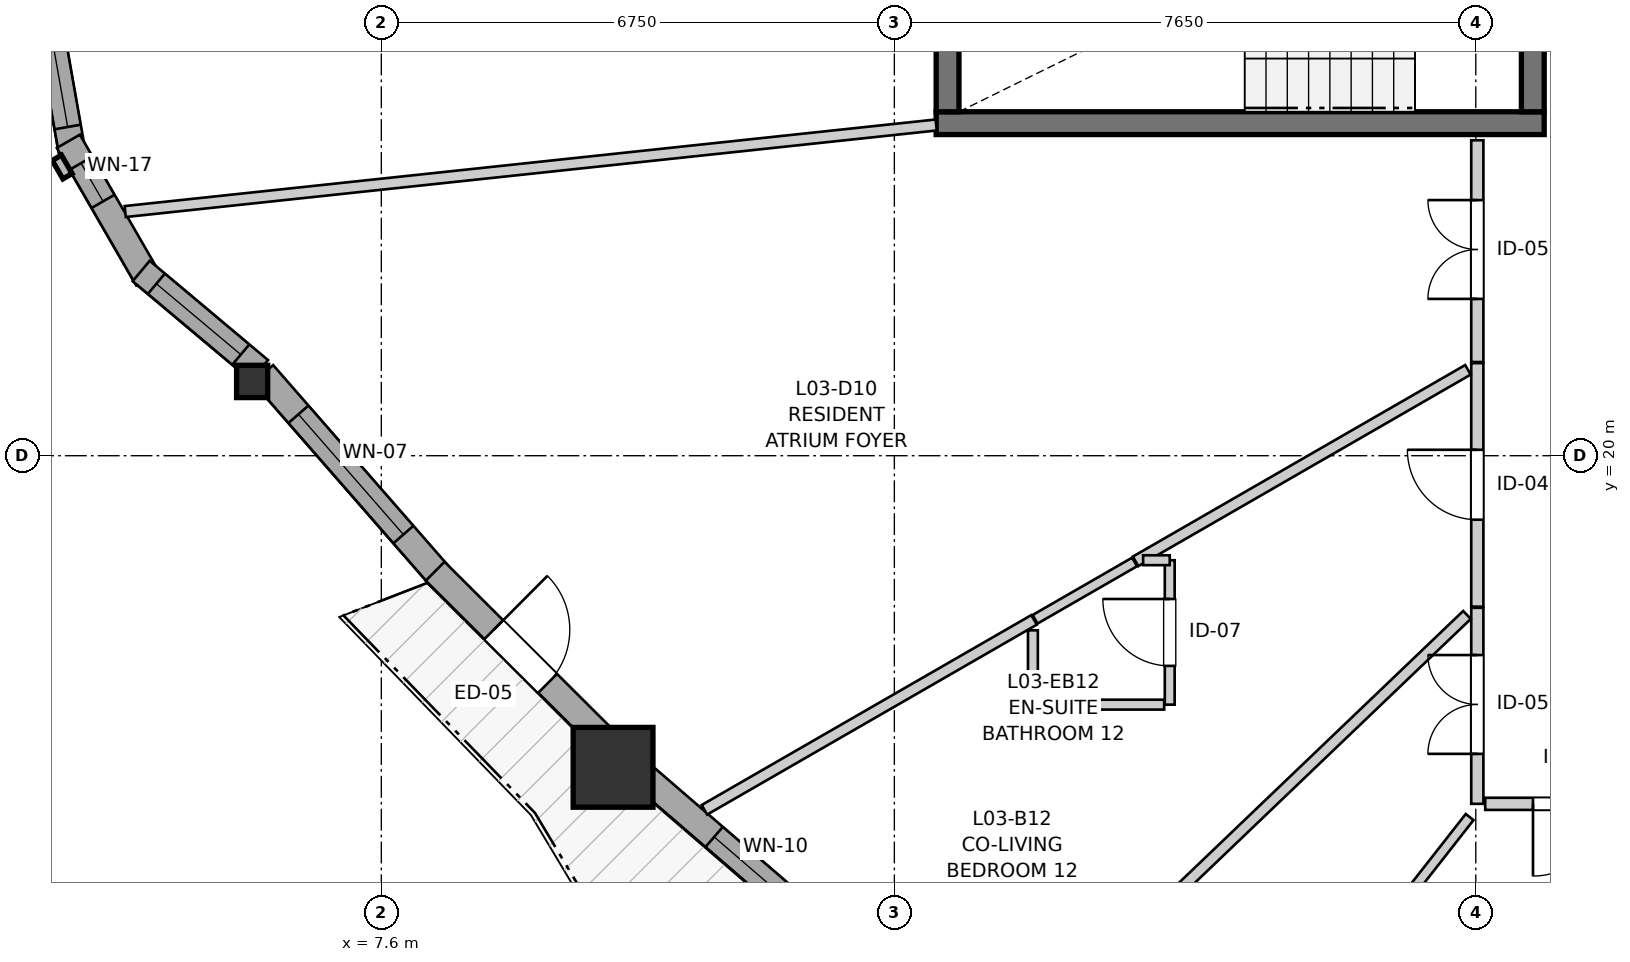
"""IFC4 building model, lengths in metres.
Left out: names, types, materials, properties, quantities, classifications, styles, units other than length and angle.
Written with IfcOpenShell. Run it as: python <this file> out.ifc"""

import sys

from ifc_helpers import new_model, si_unit, direction, frame, frame_2d, origin, origin_2d, place, context, subcontext, project, spatial, rectangle, i_section, extrude, source, transform, mapped, element, fill, save


model = new_model("IFC4")
c1 = context("Model", 3, precision=1e-05, world=origin(), true_north=direction((0.0, 1.0)))
c2 = subcontext(c1, "Body", "Model", "MODEL_VIEW")
j1 = project(units=[si_unit("LENGTHUNIT", "METRE"), si_unit("PLANEANGLEUNIT", "RADIAN")], contexts=[c1])
p1 = place(None, origin())
s1 = spatial("IfcSite", under=j1, at=p1, CompositionType="ELEMENT")
p2 = place(p1, origin())
s2 = spatial("IfcBuilding", under=s1, at=p2, CompositionType="ELEMENT")
p3 = place(p2, frame((0.0, 0.0, 14.2)))
s3 = spatial("IfcBuildingStorey", under=s2, at=p3, CompositionType="ELEMENT", Elevation=14.2)
p4 = place(p3, frame((14.9, 24.375, 0.0), z_axis=(0.0, 0.0, 1.0), x_axis=(1.0, 0.0, 0.0)))
e1 = element("IfcWall", 1, at=p4, inside=s3, PredefinedType="SHEAR", context=c2, shape_type="SweptSolid", body=[
    extrude(rectangle(XDim=8.0, YDim=0.3, at=frame_2d((4.0, 0.0))), origin(), (0.0, 0.0, 1.0), 2.94),
])
p5 = place(p3, frame((15.05, 27.475, 0.0), z_axis=(0.0, 0.0, 1.0), x_axis=(0.0, -1.0, 0.0)))
e2 = element("IfcWall", 2, at=p5, inside=s3, PredefinedType="SHEAR", context=c2, shape_type="SweptSolid", body=[
    extrude(rectangle(XDim=2.95, YDim=0.3, at=frame_2d((1.475, 0.0))), origin(), (0.0, 0.0, 1.0), 2.94),
])
p6 = place(p3, frame((22.75, 24.525, 0.0), z_axis=(0.0, 0.0, 1.0), x_axis=(0.0, 1.0, 0.0)))
e3 = element("IfcWall", 3, at=p6, inside=s3, PredefinedType="SHEAR", context=c2, shape_type="SweptSolid", body=[
    extrude(rectangle(XDim=2.95, YDim=0.3, at=frame_2d((1.475, 0.0))), origin(), (0.0, 0.0, 1.0), 2.94),
])
p7 = place(p6, frame((0.985, 0.0, 0.0)))
e4 = element("IfcOpeningElement", 4, at=p7, cuts=e3, PredefinedType="OPENING", context=c2, shape_type="SweptSolid", body=[
    extrude(rectangle(XDim=0.98, YDim=2.15, at=frame_2d((0.49, 1.075))), frame((0.0, 0.16, 0.0), z_axis=(0.0, -1.0, 0.0), x_axis=(1.0, 0.0, 0.0)), (0.0, 0.0, 1.0), 0.32),
])
m1 = source(origin(), c2, "Body", "SweptSolid", [
    extrude(i_section(OverallWidth=0.409, OverallDepth=0.425, WebThickness=0.03, FlangeThickness=0.048, FilletRadius=0.015, at=origin_2d()), origin(), (0.0, 0.0, 1.0), 2.94),
])
p8 = place(p3, frame((5.9, 20.977, 0.0), z_axis=(0.0, 0.0, 1.0), x_axis=(1.0, 0.0, 0.0)))
e5 = element("IfcColumn", 5, at=p8, inside=s3, PredefinedType="PILASTER", context=c2, shape_type="MappedRepresentation", body=[
    mapped(m1, transform((0.0, 0.0, 0.0), x_axis=(1.0, 0.0, 0.0), y_axis=(0.0, 1.0, 0.0), z_axis=(0.0, 0.0, 1.0), scale=1.0)),
])
m2 = source(origin(), c2, "Body", "SweptSolid", [
    extrude(rectangle(XDim=1.05, YDim=1.05, at=origin_2d()), origin(), (0.0, 0.0, 1.0), 2.94),
])
p9 = place(p3, frame((10.649, 15.9, 0.0), z_axis=(0.0, 0.0, 1.0), x_axis=(1.0, 0.0, 0.0)))
e6 = element("IfcColumn", 6, at=p9, inside=s3, PredefinedType="COLUMN", context=c2, shape_type="MappedRepresentation", body=[
    mapped(m2, transform((0.0, 0.0, 0.0), x_axis=(1.0, 0.0, 0.0), y_axis=(0.0, 1.0, 0.0), z_axis=(0.0, 0.0, 1.0), scale=1.0)),
])
p10 = place(p3, frame((3.166, 26.068, 0.0), z_axis=(0.0, 0.0, 1.0), x_axis=(0.173672066494, -0.984803540469, 0.0)))
e7 = element("IfcWall", 7, at=p10, inside=s3, PredefinedType="SOLIDWALL", context=c2, shape_type="SweptSolid", body=[
    extrude(rectangle(XDim=2.09, YDim=0.35, at=frame_2d((1.045, 0.0))), origin(), (0.0, 0.0, 1.0), 2.42),
])
p11 = place(p10, frame((0.32, 0.0, 0.82)))
e8 = element("IfcOpeningElement", 8, at=p11, cuts=e7, PredefinedType="OPENING", context=c2, shape_type="SweptSolid", body=[
    extrude(rectangle(XDim=1.45, YDim=1.25, at=frame_2d((0.725, 0.625))), frame((0.0, 0.185, 0.0), z_axis=(0.0, -1.0, 0.0), x_axis=(1.0, 0.0, 0.0)), (0.0, 0.0, 1.0), 0.37),
])
p12 = place(p3, frame((3.482, 24.137, 0.0), z_axis=(0.0, 0.0, 1.0), x_axis=(0.499995423472, -0.866028046028, 0.0)))
e9 = element("IfcWall", 9, at=p12, inside=s3, PredefinedType="SOLIDWALL", context=c2, shape_type="SweptSolid", body=[
    extrude(rectangle(XDim=2.09, YDim=0.35, at=frame_2d((1.045, 0.0))), origin(), (0.0, 0.0, 1.0), 2.42),
])
p13 = place(p12, frame((0.333, 0.0, 0.82)))
e10 = element("IfcOpeningElement", 10, at=p13, cuts=e9, PredefinedType="OPENING", context=c2, shape_type="SweptSolid", body=[
    extrude(rectangle(XDim=0.58, YDim=1.35, at=frame_2d((0.29, 0.675))), frame((0.0, 0.185, 0.0), z_axis=(0.0, -1.0, 0.0), x_axis=(1.0, 0.0, 0.0)), (0.0, 0.0, 1.0), 0.37),
])
p14 = place(p3, frame((4.44, 22.43, 0.0), z_axis=(0.0, 0.0, 1.0), x_axis=(0.766090423188, -0.642732808793, 0.0)))
e11 = element("IfcWall", 11, at=p14, inside=s3, PredefinedType="SOLIDWALL", context=c2, shape_type="SweptSolid", body=[
    extrude(rectangle(XDim=2.032, YDim=0.35, at=frame_2d((1.016, 0.0))), origin(), (0.0, 0.0, 1.0), 2.42),
])
p15 = place(p14, frame((0.261, 0.0, 0.82)))
e12 = element("IfcOpeningElement", 12, at=p15, cuts=e11, PredefinedType="OPENING", context=c2, shape_type="SweptSolid", body=[
    extrude(rectangle(XDim=1.45, YDim=1.25, at=frame_2d((0.725, 0.625))), frame((0.0, 0.185, 0.0), z_axis=(0.0, -1.0, 0.0), x_axis=(1.0, 0.0, 0.0)), (0.0, 0.0, 1.0), 0.37),
])
p16 = place(p3, frame((6.045, 21.077, 0.0), z_axis=(0.0, 0.0, 1.0), x_axis=(0.657628390725, -0.753342485004, 0.0)))
e13 = element("IfcWall", 13, at=p16, inside=s3, PredefinedType="SOLIDWALL", context=c2, shape_type="SweptSolid", body=[
    extrude(rectangle(XDim=3.533, YDim=0.35, at=frame_2d((1.766, 0.0))), origin(), (0.0, 0.0, 1.0), 2.42),
])
p17 = place(p16, frame((0.706, 0.0, 0.82)))
e14 = element("IfcOpeningElement", 14, at=p17, cuts=e13, PredefinedType="OPENING", context=c2, shape_type="SweptSolid", body=[
    extrude(rectangle(XDim=2.1, YDim=1.4, at=frame_2d((1.05, 0.7))), frame((0.0, 0.185, 0.0), z_axis=(0.0, -1.0, 0.0), x_axis=(1.0, 0.0, 0.0)), (0.0, 0.0, 1.0), 0.37),
])
p18 = place(p3, frame((8.308, 18.48, 0.0), z_axis=(0.0, 0.0, 1.0), x_axis=(0.708411049028, -0.705800103156, 0.0)))
e15 = element("IfcWall", 15, at=p18, inside=s3, PredefinedType="SOLIDWALL", context=c2, shape_type="SweptSolid", body=[
    extrude(rectangle(XDim=3.179, YDim=0.35, at=frame_2d((1.59, 0.0))), origin(), (0.0, 0.0, 1.0), 2.42),
])
p19 = place(p18, frame((1.09, 0.0, 0.0)))
e16 = element("IfcOpeningElement", 16, at=p19, cuts=e15, PredefinedType="OPENING", context=c2, shape_type="SweptSolid", body=[
    extrude(rectangle(XDim=1.0, YDim=2.1, at=frame_2d((0.5, 1.05))), frame((0.0, 0.185, 0.0), z_axis=(0.0, -1.0, 0.0), x_axis=(1.0, 0.0, 0.0)), (0.0, 0.0, 1.0), 0.37),
])
p20 = place(p3, frame((10.99, 15.837, 0.0), z_axis=(0.0, 0.0, 1.0), x_axis=(0.757465946779, -0.652874673632, 0.0)))
e17 = element("IfcWall", 17, at=p20, inside=s3, PredefinedType="SOLIDWALL", context=c2, shape_type="SweptSolid", body=[
    extrude(rectangle(XDim=3.123, YDim=0.35, at=frame_2d((1.562, 0.0))), origin(), (0.0, 0.0, 1.0), 2.42),
])
p21 = place(p20, frame((1.305, 0.0, 0.82)))
e18 = element("IfcOpeningElement", 18, at=p21, cuts=e17, PredefinedType="OPENING", context=c2, shape_type="SweptSolid", body=[
    extrude(rectangle(XDim=1.4, YDim=1.35, at=frame_2d((0.7, 0.675))), frame((0.0, 0.185, 0.0), z_axis=(0.0, -1.0, 0.0), x_axis=(1.0, 0.0, 0.0)), (0.0, 0.0, 1.0), 0.37),
])
p22 = place(p3, frame((22.02, 18.014, 0.0), z_axis=(0.0, 0.0, 1.0), x_axis=(0.0, 1.0, 0.0)))
e19 = element("IfcWall", 19, at=p22, inside=s3, PredefinedType="PARTITIONING", context=c2, shape_type="SweptSolid", body=[
    extrude(rectangle(XDim=3.204, YDim=0.16, at=frame_2d((1.602, 0.0))), origin(), (0.0, 0.0, 1.0), 2.94),
])
p23 = place(p22, frame((1.144, 0.0, 0.0)))
e20 = element("IfcOpeningElement", 20, at=p23, cuts=e19, PredefinedType="OPENING", context=c2, shape_type="SweptSolid", body=[
    extrude(rectangle(XDim=0.92, YDim=2.1, at=frame_2d((0.46, 1.05))), frame((0.0, 0.09, 0.0), z_axis=(0.0, -1.0, 0.0), x_axis=(1.0, 0.0, 0.0)), (0.0, 0.0, 1.0), 0.18),
])
p24 = place(p3, frame((22.02, 21.233, 0.0), z_axis=(0.0, 0.0, 1.0), x_axis=(0.0, 1.0, 0.0)))
e21 = element("IfcWall", 21, at=p24, inside=s3, PredefinedType="PARTITIONING", context=c2, shape_type="SweptSolid", body=[
    extrude(rectangle(XDim=2.917, YDim=0.16, at=frame_2d((1.458, 0.0))), origin(), (0.0, 0.0, 1.0), 2.94),
])
p25 = place(p24, frame((0.83, 0.0, 0.0)))
e22 = element("IfcOpeningElement", 22, at=p25, cuts=e21, PredefinedType="OPENING", context=c2, shape_type="SweptSolid", body=[
    extrude(rectangle(XDim=1.3, YDim=2.1, at=frame_2d((0.65, 1.05))), frame((0.0, 0.09, 0.0), z_axis=(0.0, -1.0, 0.0), x_axis=(1.0, 0.0, 0.0)), (0.0, 0.0, 1.0), 0.18),
])
p26 = place(p3, frame((22.02, 15.42, 0.0), z_axis=(0.0, 0.0, 1.0), x_axis=(0.0, 1.0, 0.0)))
e23 = element("IfcWall", 23, at=p26, inside=s3, PredefinedType="PARTITIONING", context=c2, shape_type="SweptSolid", body=[
    extrude(rectangle(XDim=2.579, YDim=0.16, at=frame_2d((1.29, 0.0))), origin(), (0.0, 0.0, 1.0), 2.94),
])
p27 = place(p26, frame((0.657, 0.0, 0.0)))
e24 = element("IfcOpeningElement", 24, at=p27, cuts=e23, PredefinedType="OPENING", context=c2, shape_type="SweptSolid", body=[
    extrude(rectangle(XDim=1.3, YDim=2.1, at=frame_2d((0.65, 1.05))), frame((0.0, 0.09, 0.0), z_axis=(0.0, -1.0, 0.0), x_axis=(1.0, 0.0, 0.0)), (0.0, 0.0, 1.0), 0.18),
])
p28 = place(p3, frame((24.368, 15.42, 0.0), z_axis=(0.0, 0.0, 1.0), x_axis=(-1.0, 0.0, 0.0)))
e25 = element("IfcWall", 25, at=p28, inside=s3, PredefinedType="PARTITIONING", context=c2, shape_type="SweptSolid", body=[
    extrude(rectangle(XDim=2.244, YDim=0.16, at=frame_2d((1.122, 0.0))), origin(), (0.0, 0.0, 1.0), 2.94),
])
p29 = place(p28, frame((0.666, 0.0, 0.0)))
e26 = element("IfcOpeningElement", 26, at=p29, cuts=e25, PredefinedType="OPENING", context=c2, shape_type="SweptSolid", body=[
    extrude(rectangle(XDim=0.95, YDim=2.1, at=frame_2d((0.475, 1.05))), frame((0.0, 0.09, 0.0), z_axis=(0.0, -1.0, 0.0), x_axis=(1.0, 0.0, 0.0)), (0.0, 0.0, 1.0), 0.18),
])
p30 = place(p3, frame((17.973, 16.725, 0.0), z_axis=(0.0, 0.0, 1.0), x_axis=(0.0, 1.0, 0.0)))
e27 = element("IfcWall", 27, at=p30, inside=s3, PredefinedType="PARTITIONING", context=c2, shape_type="SweptSolid", body=[
    extrude(rectangle(XDim=1.9, YDim=0.13, at=frame_2d((0.95, 0.0))), origin(), (0.0, 0.0, 1.0), 2.94),
])
p31 = place(p30, frame((0.51, 0.0, 0.0)))
e28 = element("IfcOpeningElement", 28, at=p31, cuts=e27, PredefinedType="OPENING", context=c2, shape_type="SweptSolid", body=[
    extrude(rectangle(XDim=0.88, YDim=2.05, at=frame_2d((0.44, 1.025))), frame((0.0, 0.075, 0.0), z_axis=(0.0, -1.0, 0.0), x_axis=(1.0, 0.0, 0.0)), (0.0, 0.0, 1.0), 0.15),
])
p32 = place(p3, frame((4.231, 23.212, 0.0), z_axis=(0.0, 0.0, 1.0), x_axis=(0.994353055544, 0.106122575023, 0.0)))
e29 = element("IfcWall", 29, at=p32, inside=s3, PredefinedType="PARTITIONING", context=c2, shape_type="SweptSolid", body=[
    extrude(rectangle(XDim=10.73, YDim=0.145, at=frame_2d((5.365, 0.0))), origin(), (0.0, 0.0, 1.0), 2.94),
])
p33 = place(p3, frame((15.888, 12.171, 0.0), z_axis=(0.0, 0.0, 1.0), x_axis=(0.722733244608, 0.691127091886, 0.0)))
e30 = element("IfcWall", 30, at=p33, inside=s3, PredefinedType="PARTITIONING", context=c2, shape_type="SweptSolid", body=[
    extrude(rectangle(XDim=8.296, YDim=0.145, at=frame_2d((4.148, 0.0))), origin(), (0.0, 0.0, 1.0), 2.94),
])
p34 = place(p3, frame((18.296, 10.625, 0.0), z_axis=(0.0, 0.0, 1.0), x_axis=(0.616906721473, 0.787036274261, 0.0)))
e31 = element("IfcWall", 31, at=p34, inside=s3, PredefinedType="PARTITIONING", context=c2, shape_type="SweptSolid", body=[
    extrude(rectangle(XDim=5.872, YDim=0.13, at=frame_2d((2.936, 0.0))), origin(), (0.0, 0.0, 1.0), 2.94),
])
p35 = place(p3, frame((17.524, 18.61, 0.0), z_axis=(0.0, 0.0, 1.0), x_axis=(0.866454437228, 0.499256154903, 0.0)))
e32 = element("IfcWall", 32, at=p35, inside=s3, PredefinedType="PARTITIONING", context=c2, shape_type="SweptSolid", body=[
    extrude(rectangle(XDim=5.047, YDim=0.145, at=frame_2d((2.523, 0.0))), origin(), (0.0, 0.0, 1.0), 2.94),
])
p36 = place(p3, frame((11.851, 15.342, 0.0), z_axis=(0.0, 0.0, 1.0), x_axis=(0.86649075999, 0.499193111784, 0.0)))
e33 = element("IfcWall", 33, at=p36, inside=s3, PredefinedType="PARTITIONING", context=c2, shape_type="SweptSolid", body=[
    extrude(rectangle(XDim=5.005, YDim=0.145, at=frame_2d((2.502, 0.0))), origin(), (0.0, 0.0, 1.0), 2.94),
])
p37 = place(p3, frame((16.173, 16.725, 0.0), z_axis=(0.0, 0.0, 1.0), x_axis=(1.0, 0.0, 0.0)))
e34 = element("IfcWall", 34, at=p37, inside=s3, PredefinedType="PARTITIONING", context=c2, shape_type="SweptSolid", body=[
    extrude(rectangle(XDim=1.727, YDim=0.13, at=frame_2d((0.863, 0.0))), origin(), (0.0, 0.0, 1.0), 2.94),
])
p38 = place(p3, frame((16.201, 17.848, 0.0), z_axis=(0.0, 0.0, 1.0), x_axis=(0.866448907576, 0.49926575144, 0.0)))
e35 = element("IfcWall", 35, at=p38, inside=s3, PredefinedType="PARTITIONING", context=c2, shape_type="SweptSolid", body=[
    extrude(rectangle(XDim=1.512, YDim=0.13, at=frame_2d((0.756, 0.0))), origin(), (0.0, 0.0, 1.0), 2.94),
])
p39 = place(p3, frame((16.173, 16.798, 0.0), z_axis=(0.0, 0.0, 1.0), x_axis=(0.0, 1.0, 0.0)))
e36 = element("IfcWall", 36, at=p39, inside=s3, PredefinedType="PARTITIONING", context=c2, shape_type="SweptSolid", body=[
    extrude(rectangle(XDim=0.905, YDim=0.13, at=frame_2d((0.452, 0.0))), origin(), (0.0, 0.0, 1.0), 2.94),
])
p40 = place(p3, frame((17.623, 18.625, 0.0), z_axis=(0.0, 0.0, 1.0), x_axis=(1.0, 0.0, 0.0)))
e37 = element("IfcWall", 37, at=p40, inside=s3, PredefinedType="PARTITIONING", context=c2, shape_type="SweptSolid", body=[
    extrude(rectangle(XDim=0.35, YDim=0.13, at=frame_2d((0.175, 0.0))), origin(), (0.0, 0.0, 1.0), 2.94),
])
m3 = source(origin(), c2, "Body", "SweptSolid", [
    extrude(rectangle(XDim=1.45, YDim=1.25, at=frame_2d((0.725, 0.625))), frame((0.0, 0.03, 0.0), z_axis=(0.0, -1.0, 0.0), x_axis=(1.0, 0.0, 0.0)), (0.0, 0.0, 1.0), 0.06),
])
p41 = place(p11, origin())
e38 = element("IfcWindow", 38, at=p41, inside=s3, PartitioningType="SINGLE_PANEL", PredefinedType="WINDOW", context=c2, shape_type="MappedRepresentation", body=[
    mapped(m3, transform((0.0, 0.0, 0.0), x_axis=(1.0, 0.0, 0.0), y_axis=(0.0, 1.0, 0.0), z_axis=(0.0, 0.0, 1.0), scale=1.0)),
])
fill(e8, e38)
m4 = source(origin(), c2, "Body", "SweptSolid", [
    extrude(rectangle(XDim=0.58, YDim=1.35, at=frame_2d((0.29, 0.675))), frame((0.0, 0.03, 0.0), z_axis=(0.0, -1.0, 0.0), x_axis=(1.0, 0.0, 0.0)), (0.0, 0.0, 1.0), 0.06),
])
p42 = place(p13, origin())
e39 = element("IfcWindow", 39, at=p42, inside=s3, PartitioningType="SINGLE_PANEL", PredefinedType="WINDOW", context=c2, shape_type="MappedRepresentation", body=[
    mapped(m4, transform((0.0, 0.0, 0.0), x_axis=(1.0, 0.0, 0.0), y_axis=(0.0, 1.0, 0.0), z_axis=(0.0, 0.0, 1.0), scale=1.0)),
])
fill(e10, e39)
p43 = place(p15, origin())
e40 = element("IfcWindow", 40, at=p43, inside=s3, PartitioningType="SINGLE_PANEL", PredefinedType="WINDOW", context=c2, shape_type="MappedRepresentation", body=[
    mapped(m3, transform((0.0, 0.0, 0.0), x_axis=(1.0, 0.0, 0.0), y_axis=(0.0, 1.0, 0.0), z_axis=(0.0, 0.0, 1.0), scale=1.0)),
])
fill(e12, e40)
m5 = source(origin(), c2, "Body", "SweptSolid", [
    extrude(rectangle(XDim=2.1, YDim=1.4, at=frame_2d((1.05, 0.7))), frame((0.0, 0.03, 0.0), z_axis=(0.0, -1.0, 0.0), x_axis=(1.0, 0.0, 0.0)), (0.0, 0.0, 1.0), 0.06),
])
p44 = place(p17, origin())
e41 = element("IfcWindow", 41, at=p44, inside=s3, PartitioningType="SINGLE_PANEL", PredefinedType="WINDOW", context=c2, shape_type="MappedRepresentation", body=[
    mapped(m5, transform((0.0, 0.0, 0.0), x_axis=(1.0, 0.0, 0.0), y_axis=(0.0, 1.0, 0.0), z_axis=(0.0, 0.0, 1.0), scale=1.0)),
])
fill(e14, e41)
m6 = source(origin(), c2, "Body", "SweptSolid", [
    extrude(rectangle(XDim=1.4, YDim=1.35, at=frame_2d((0.7, 0.675))), frame((0.0, 0.03, 0.0), z_axis=(0.0, -1.0, 0.0), x_axis=(1.0, 0.0, 0.0)), (0.0, 0.0, 1.0), 0.06),
])
p45 = place(p21, origin())
e42 = element("IfcWindow", 42, at=p45, inside=s3, PartitioningType="SINGLE_PANEL", PredefinedType="WINDOW", context=c2, shape_type="MappedRepresentation", body=[
    mapped(m6, transform((0.0, 0.0, 0.0), x_axis=(1.0, 0.0, 0.0), y_axis=(0.0, 1.0, 0.0), z_axis=(0.0, 0.0, 1.0), scale=1.0)),
])
fill(e18, e42)
m7 = source(origin(), c2, "Body", "SweptSolid", [
    extrude(rectangle(XDim=1.0, YDim=2.1, at=frame_2d((0.5, 1.05))), frame((0.0, 0.025, 0.0), z_axis=(0.0, -1.0, 0.0), x_axis=(1.0, 0.0, 0.0)), (0.0, 0.0, 1.0), 0.05),
])
p46 = place(p19, origin())
e43 = element("IfcDoor", 43, at=p46, inside=s3, OperationType="SINGLE_SWING_LEFT", PredefinedType="DOOR", context=c2, shape_type="MappedRepresentation", body=[
    mapped(m7, transform((0.0, 0.0, 0.0), x_axis=(1.0, 0.0, 0.0), y_axis=(0.0, 1.0, 0.0), z_axis=(0.0, 0.0, 1.0), scale=1.0)),
])
fill(e16, e43)
m8 = source(origin(), c2, "Body", "SweptSolid", [
    extrude(rectangle(XDim=0.92, YDim=2.1, at=frame_2d((0.46, 1.05))), frame((0.0, 0.025, 0.0), z_axis=(0.0, -1.0, 0.0), x_axis=(1.0, 0.0, 0.0)), (0.0, 0.0, 1.0), 0.05),
])
p47 = place(p23, origin())
e44 = element("IfcDoor", 44, at=p47, inside=s3, OperationType="SINGLE_SWING_RIGHT", PredefinedType="DOOR", context=c2, shape_type="MappedRepresentation", body=[
    mapped(m8, transform((0.0, 0.0, 0.0), x_axis=(1.0, 0.0, 0.0), y_axis=(0.0, 1.0, 0.0), z_axis=(0.0, 0.0, 1.0), scale=1.0)),
])
fill(e20, e44)
m9 = source(origin(), c2, "Body", "SweptSolid", [
    extrude(rectangle(XDim=1.3, YDim=2.1, at=frame_2d((0.65, 1.05))), frame((0.0, 0.025, 0.0), z_axis=(0.0, -1.0, 0.0), x_axis=(1.0, 0.0, 0.0)), (0.0, 0.0, 1.0), 0.05),
])
p48 = place(p25, origin())
e45 = element("IfcDoor", 45, at=p48, inside=s3, OperationType="DOUBLE_DOOR_SINGLE_SWING", PredefinedType="DOOR", context=c2, shape_type="MappedRepresentation", body=[
    mapped(m9, transform((0.0, 0.0, 0.0), x_axis=(1.0, 0.0, 0.0), y_axis=(0.0, 1.0, 0.0), z_axis=(0.0, 0.0, 1.0), scale=1.0)),
])
fill(e22, e45)
p49 = place(p27, origin())
e46 = element("IfcDoor", 46, at=p49, inside=s3, OperationType="DOUBLE_DOOR_SINGLE_SWING", PredefinedType="DOOR", context=c2, shape_type="MappedRepresentation", body=[
    mapped(m9, transform((0.0, 0.0, 0.0), x_axis=(1.0, 0.0, 0.0), y_axis=(0.0, 1.0, 0.0), z_axis=(0.0, 0.0, 1.0), scale=1.0)),
])
fill(e24, e46)
m10 = source(origin(), c2, "Body", "SweptSolid", [
    extrude(rectangle(XDim=0.95, YDim=2.1, at=frame_2d((0.475, 1.05))), frame((0.0, 0.025, 0.0), z_axis=(0.0, -1.0, 0.0), x_axis=(1.0, 0.0, 0.0)), (0.0, 0.0, 1.0), 0.05),
])
p50 = place(p29, origin())
e47 = element("IfcDoor", 47, at=p50, inside=s3, OperationType="SINGLE_SWING_RIGHT", PredefinedType="DOOR", context=c2, shape_type="MappedRepresentation", body=[
    mapped(m10, transform((0.0, 0.0, 0.0), x_axis=(1.0, 0.0, 0.0), y_axis=(0.0, 1.0, 0.0), z_axis=(0.0, 0.0, 1.0), scale=1.0)),
])
fill(e26, e47)
m11 = source(origin(), c2, "Body", "SweptSolid", [
    extrude(rectangle(XDim=0.88, YDim=2.05, at=frame_2d((0.44, 1.025))), frame((0.0, 0.025, 0.0), z_axis=(0.0, -1.0, 0.0), x_axis=(1.0, 0.0, 0.0)), (0.0, 0.0, 1.0), 0.05),
])
p51 = place(p31, origin())
e48 = element("IfcDoor", 48, at=p51, inside=s3, OperationType="SINGLE_SWING_RIGHT", PredefinedType="DOOR", context=c2, shape_type="MappedRepresentation", body=[
    mapped(m11, transform((0.0, 0.0, 0.0), x_axis=(1.0, 0.0, 0.0), y_axis=(0.0, 1.0, 0.0), z_axis=(0.0, 0.0, 1.0), scale=1.0)),
])
fill(e28, e48)
save(model, sys.argv[1])
